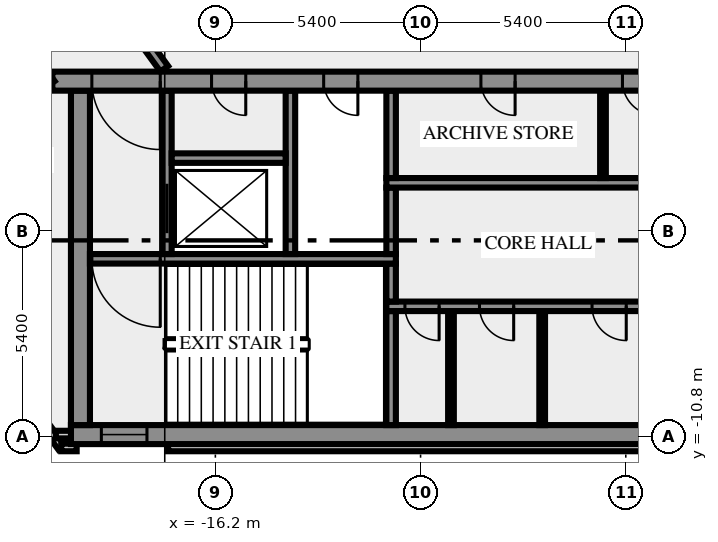
"""IFC4 building model, lengths in metres.
Left out: names, types, materials, properties, quantities, classifications, styles, units other than length and angle.
Written with IfcOpenShell. Run it as: python <this file> out.ifc"""

import sys

from ifc_helpers import new_model, si_unit, direction, frame, frame_2d, origin, place, context, subcontext, project, spatial, rectangle, extrude, element, fill, save


model = new_model("IFC4")
c1 = context("Model", 3, precision=1e-05, world=origin(), true_north=direction((0.0, 1.0)))
c2 = subcontext(c1, "Body", "Model", "MODEL_VIEW")
j1 = project(units=[si_unit("LENGTHUNIT", "METRE"), si_unit("PLANEANGLEUNIT", "RADIAN")], contexts=[c1])
p1 = place(None, origin())
s1 = spatial("IfcSite", under=j1, at=p1, CompositionType="ELEMENT")
p2 = place(p1, origin())
s2 = spatial("IfcBuilding", under=s1, at=p2, CompositionType="ELEMENT")
p3 = place(p2, frame((0.0, 0.0, 164.0)))
s3 = spatial("IfcBuildingStorey", under=s2, at=p3, CompositionType="ELEMENT", Elevation=164.0)
p4 = place(p3, frame((-21.833, -8.909, 0.0), z_axis=(0.0, 0.0, 1.0), x_axis=(0.587766567315, -0.809030569476, 0.0)))
e1 = element("IfcWall", 1, at=p4, inside=s3, PredefinedType="SOLIDWALL", context=c2, shape_type="SweptSolid", body=[
    extrude(rectangle(XDim=2.688, YDim=0.2, at=frame_2d((1.344, 0.0))), origin(), (0.0, 0.0, 1.0), 3.65),
])
p5 = place(p3, frame((-20.256, -11.088, 0.0), z_axis=(0.0, 0.0, 1.0), x_axis=(1.0, 0.0, 0.0)))
e2 = element("IfcWall", 2, at=p5, inside=s3, PredefinedType="SOLIDWALL", context=c2, shape_type="SweptSolid", body=[
    extrude(rectangle(XDim=0.406, YDim=0.2, at=frame_2d((0.203, 0.0))), origin(), (0.0, 0.0, 1.0), 3.65),
])
p6 = place(p3, frame((-17.444, -11.088, 0.0), z_axis=(0.0, 0.0, 1.0), x_axis=(1.0, 0.0, 0.0)))
e3 = element("IfcWall", 3, at=p6, inside=s3, PredefinedType="SOLIDWALL", context=c2, shape_type="SweptSolid", body=[
    extrude(rectangle(XDim=34.888, YDim=0.2, at=frame_2d((17.444, 0.0))), origin(), (0.0, 0.0, 1.0), 3.65),
])
p7 = place(p3, frame((-19.98, -10.75, 0.0), z_axis=(0.0, 0.0, 1.0), x_axis=(-1.0, 0.0, 0.0)))
e4 = element("IfcWall", 4, at=p7, inside=s3, PredefinedType="SOLIDWALL", context=c2, shape_type="SweptSolid", body=[
    extrude(rectangle(XDim=0.417, YDim=0.2, at=frame_2d((0.208, 0.0))), origin(), (0.0, 0.0, 1.0), 3.65),
])
p8 = place(p3, frame((-20.0, -10.75, 0.0), z_axis=(0.0, 0.0, 1.0), x_axis=(1.0, 0.0, 0.0)))
e5 = element("IfcWall", 5, at=p8, inside=s3, PredefinedType="SHEAR", context=c2, shape_type="SweptSolid", body=[
    extrude(rectangle(XDim=40.0, YDim=0.5, at=frame_2d((20.0, 0.0))), origin(), (0.0, 0.0, 1.0), 3.65),
])
p9 = place(p8, frame((0.8, 0.0, 1.0)))
e6 = element("IfcOpeningElement", 6, at=p9, cuts=e5, PredefinedType="OPENING", context=c2, shape_type="SweptSolid", body=[
    extrude(rectangle(XDim=1.2, YDim=1.2, at=frame_2d((0.6, 0.6))), frame((0.0, 0.26, 0.0), z_axis=(0.0, -1.0, 0.0), x_axis=(1.0, 0.0, 0.0)), (0.0, 0.0, 1.0), 0.52),
])
p10 = place(p8, frame((38.0, 0.0, 1.0)))
e7 = element("IfcOpeningElement", 7, at=p10, cuts=e5, PredefinedType="OPENING", context=c2, shape_type="SweptSolid", body=[
    extrude(rectangle(XDim=1.2, YDim=1.2, at=frame_2d((0.6, 0.6))), frame((0.0, 0.26, 0.0), z_axis=(0.0, -1.0, 0.0), x_axis=(1.0, 0.0, 0.0)), (0.0, 0.0, 1.0), 0.52),
])
p11 = place(p3, frame((-19.75, -10.5, 0.0), z_axis=(0.0, 0.0, 1.0), x_axis=(0.0, 1.0, 0.0)))
e8 = element("IfcWall", 8, at=p11, inside=s3, PredefinedType="SHEAR", context=c2, shape_type="SweptSolid", body=[
    extrude(rectangle(XDim=8.8, YDim=0.5, at=frame_2d((4.4, 0.0))), origin(), (0.0, 0.0, 1.0), 3.65),
])
p12 = place(p3, frame((-11.575, -10.5, 0.0), z_axis=(0.0, 0.0, 1.0), x_axis=(0.0, 1.0, 0.0)))
e9 = element("IfcWall", 9, at=p12, inside=s3, PredefinedType="SHEAR", context=c2, shape_type="SweptSolid", body=[
    extrude(rectangle(XDim=3.0, YDim=0.25, at=frame_2d((1.5, 0.0))), origin(), (0.0, 0.0, 1.0), 3.65),
])
for number, where, z_axis, x_axis in (
    (10, (-10.0, -10.5, 0.0), (0.0, 0.0, 1.0), (0.0, 1.0, 0.0)),
    (11, (-7.6, -10.5, 0.0), (0.0, 0.0, 1.0), (0.0, 1.0, 0.0)),
):
    element("IfcWall", number, at=place(p3, frame(where, z_axis=z_axis, x_axis=x_axis)), inside=s3, PredefinedType="PARTITIONING", context=c2, shape_type="SweptSolid", body=[
        extrude(rectangle(XDim=3.0, YDim=0.15, at=frame_2d((1.5, 0.0))), origin(), (0.0, 0.0, 1.0), 3.65),
    ])
p13 = place(p3, frame((11.7, -7.375, 0.0), z_axis=(0.0, 0.0, 1.0), x_axis=(-1.0, 0.0, 0.0)))
e12 = element("IfcWall", 12, at=p13, inside=s3, PredefinedType="SHEAR", context=c2, shape_type="SweptSolid", body=[
    extrude(rectangle(XDim=23.4, YDim=0.25, at=frame_2d((11.7, 0.0))), origin(), (0.0, 0.0, 1.0), 3.65),
])
p14 = place(p13, frame((22.012, 0.0, 0.0)))
e13 = element("IfcOpeningElement", 13, at=p14, cuts=e12, PredefinedType="OPENING", context=c2, shape_type="SweptSolid", body=[
    extrude(rectangle(XDim=0.9, YDim=2.1, at=frame_2d((0.45, 1.05))), frame((0.0, 0.135, 0.0), z_axis=(0.0, -1.0, 0.0), x_axis=(1.0, 0.0, 0.0)), (0.0, 0.0, 1.0), 0.27),
])
p15 = place(p13, frame((20.05, 0.0, 0.0)))
e14 = element("IfcOpeningElement", 14, at=p15, cuts=e12, PredefinedType="OPENING", context=c2, shape_type="SweptSolid", body=[
    extrude(rectangle(XDim=0.9, YDim=2.1, at=frame_2d((0.45, 1.05))), frame((0.0, 0.135, 0.0), z_axis=(0.0, -1.0, 0.0), x_axis=(1.0, 0.0, 0.0)), (0.0, 0.0, 1.0), 0.27),
])
p16 = place(p13, frame((17.088, 0.0, 0.0)))
e15 = element("IfcOpeningElement", 15, at=p16, cuts=e12, PredefinedType="OPENING", context=c2, shape_type="SweptSolid", body=[
    extrude(rectangle(XDim=0.9, YDim=2.1, at=frame_2d((0.45, 1.05))), frame((0.0, 0.135, 0.0), z_axis=(0.0, -1.0, 0.0), x_axis=(1.0, 0.0, 0.0)), (0.0, 0.0, 1.0), 0.27),
])
p17 = place(p13, frame((14.45, 0.0, 0.0)))
e16 = element("IfcOpeningElement", 16, at=p17, cuts=e12, PredefinedType="OPENING", context=c2, shape_type="SweptSolid", body=[
    extrude(rectangle(XDim=0.9, YDim=2.1, at=frame_2d((0.45, 1.05))), frame((0.0, 0.135, 0.0), z_axis=(0.0, -1.0, 0.0), x_axis=(1.0, 0.0, 0.0)), (0.0, 0.0, 1.0), 0.27),
])
p18 = place(p13, frame((12.95, 0.0, 0.0)))
e17 = element("IfcOpeningElement", 17, at=p18, cuts=e12, PredefinedType="OPENING", context=c2, shape_type="SweptSolid", body=[
    extrude(rectangle(XDim=0.9, YDim=2.1, at=frame_2d((0.45, 1.05))), frame((0.0, 0.135, 0.0), z_axis=(0.0, -1.0, 0.0), x_axis=(1.0, 0.0, 0.0)), (0.0, 0.0, 1.0), 0.27),
])
p19 = place(p13, frame((11.475, 0.0, 0.0)))
e18 = element("IfcOpeningElement", 18, at=p19, cuts=e12, PredefinedType="OPENING", context=c2, shape_type="SweptSolid", body=[
    extrude(rectangle(XDim=0.9, YDim=2.1, at=frame_2d((0.45, 1.05))), frame((0.0, 0.135, 0.0), z_axis=(0.0, -1.0, 0.0), x_axis=(1.0, 0.0, 0.0)), (0.0, 0.0, 1.0), 0.27),
])
p20 = place(p13, frame((10.45, 0.0, 0.0)))
e19 = element("IfcOpeningElement", 19, at=p20, cuts=e12, PredefinedType="OPENING", context=c2, shape_type="SweptSolid", body=[
    extrude(rectangle(XDim=0.5, YDim=2.1, at=frame_2d((0.25, 1.05))), frame((0.0, 0.135, 0.0), z_axis=(0.0, -1.0, 0.0), x_axis=(1.0, 0.0, 0.0)), (0.0, 0.0, 1.0), 0.27),
])
p21 = place(p13, frame((8.35, 0.0, 0.0)))
e20 = element("IfcOpeningElement", 20, at=p21, cuts=e12, PredefinedType="OPENING", context=c2, shape_type="SweptSolid", body=[
    extrude(rectangle(XDim=1.1, YDim=2.1, at=frame_2d((0.55, 1.05))), frame((0.0, 0.135, 0.0), z_axis=(0.0, -1.0, 0.0), x_axis=(1.0, 0.0, 0.0)), (0.0, 0.0, 1.0), 0.27),
])
p22 = place(p13, frame((5.85, 0.0, 0.0)))
e21 = element("IfcOpeningElement", 21, at=p22, cuts=e12, PredefinedType="OPENING", context=c2, shape_type="SweptSolid", body=[
    extrude(rectangle(XDim=1.1, YDim=2.1, at=frame_2d((0.55, 1.05))), frame((0.0, 0.135, 0.0), z_axis=(0.0, -1.0, 0.0), x_axis=(1.0, 0.0, 0.0)), (0.0, 0.0, 1.0), 0.27),
])
p23 = place(p13, frame((3.35, 0.0, 0.0)))
e22 = element("IfcOpeningElement", 22, at=p23, cuts=e12, PredefinedType="OPENING", context=c2, shape_type="SweptSolid", body=[
    extrude(rectangle(XDim=1.1, YDim=2.1, at=frame_2d((0.55, 1.05))), frame((0.0, 0.135, 0.0), z_axis=(0.0, -1.0, 0.0), x_axis=(1.0, 0.0, 0.0)), (0.0, 0.0, 1.0), 0.27),
])
p24 = place(p13, frame((0.85, 0.0, 0.0)))
e23 = element("IfcOpeningElement", 23, at=p24, cuts=e12, PredefinedType="OPENING", context=c2, shape_type="SweptSolid", body=[
    extrude(rectangle(XDim=1.1, YDim=2.1, at=frame_2d((0.55, 1.05))), frame((0.0, 0.135, 0.0), z_axis=(0.0, -1.0, 0.0), x_axis=(1.0, 0.0, 0.0)), (0.0, 0.0, 1.0), 0.27),
])
p25 = place(p3, frame((-11.575, -7.25, 0.0), z_axis=(0.0, 0.0, 1.0), x_axis=(0.0, 1.0, 0.0)))
e24 = element("IfcWall", 24, at=p25, inside=s3, PredefinedType="SHEAR", context=c2, shape_type="SweptSolid", body=[
    extrude(rectangle(XDim=1.0, YDim=0.25, at=frame_2d((0.5, 0.0))), origin(), (0.0, 0.0, 1.0), 3.65),
])
p26 = place(p3, frame((-11.45, -6.125, 0.0), z_axis=(0.0, 0.0, 1.0), x_axis=(-1.0, 0.0, 0.0)))
e25 = element("IfcWall", 25, at=p26, inside=s3, PredefinedType="SHEAR", context=c2, shape_type="SweptSolid", body=[
    extrude(rectangle(XDim=8.05, YDim=0.25, at=frame_2d((4.025, 0.0))), origin(), (0.0, 0.0, 1.0), 3.65),
])
p27 = place(p26, frame((6.2, 0.0, 0.0)))
e26 = element("IfcOpeningElement", 26, at=p27, cuts=e25, PredefinedType="OPENING", context=c2, shape_type="SweptSolid", body=[
    extrude(rectangle(XDim=1.8, YDim=2.1, at=frame_2d((0.9, 1.05))), frame((0.0, 0.135, 0.0), z_axis=(0.0, -1.0, 0.0), x_axis=(1.0, 0.0, 0.0)), (0.0, 0.0, 1.0), 0.27),
])
p28 = place(p3, frame((-17.475, -6.0, 0.0), z_axis=(0.0, 0.0, 1.0), x_axis=(0.0, 1.0, 0.0)))
e27 = element("IfcWall", 27, at=p28, inside=s3, PredefinedType="SHEAR", context=c2, shape_type="SweptSolid", body=[
    extrude(rectangle(XDim=4.3, YDim=0.25, at=frame_2d((2.15, 0.0))), origin(), (0.0, 0.0, 1.0), 3.65),
])
p29 = place(p28, frame((0.55, 0.0, 0.0)))
e28 = element("IfcOpeningElement", 28, at=p29, cuts=e27, PredefinedType="OPENING", context=c2, shape_type="SweptSolid", body=[
    extrude(rectangle(XDim=1.3, YDim=2.1, at=frame_2d((0.65, 1.05))), frame((0.0, 0.135, 0.0), z_axis=(0.0, -1.0, 0.0), x_axis=(1.0, 0.0, 0.0)), (0.0, 0.0, 1.0), 0.27),
])
p30 = place(p3, frame((-14.225, -6.0, 0.0), z_axis=(0.0, 0.0, 1.0), x_axis=(0.0, 1.0, 0.0)))
e29 = element("IfcWall", 29, at=p30, inside=s3, PredefinedType="SHEAR", context=c2, shape_type="SweptSolid", body=[
    extrude(rectangle(XDim=4.3, YDim=0.25, at=frame_2d((2.15, 0.0))), origin(), (0.0, 0.0, 1.0), 3.65),
])
p31 = place(p3, frame((-11.575, -6.0, 0.0), z_axis=(0.0, 0.0, 1.0), x_axis=(0.0, 1.0, 0.0)))
e30 = element("IfcWall", 30, at=p31, inside=s3, PredefinedType="SHEAR", context=c2, shape_type="SweptSolid", body=[
    extrude(rectangle(XDim=1.75, YDim=0.25, at=frame_2d((0.875, 0.0))), origin(), (0.0, 0.0, 1.0), 3.65),
])
p32 = place(p3, frame((-11.7, -4.125, 0.0), z_axis=(0.0, 0.0, 1.0), x_axis=(1.0, 0.0, 0.0)))
e31 = element("IfcWall", 31, at=p32, inside=s3, PredefinedType="SHEAR", context=c2, shape_type="SweptSolid", body=[
    extrude(rectangle(XDim=7.75, YDim=0.25, at=frame_2d((3.875, 0.0))), origin(), (0.0, 0.0, 1.0), 3.65),
])
p33 = place(p3, frame((-11.575, -4.0, 0.0), z_axis=(0.0, 0.0, 1.0), x_axis=(0.0, 1.0, 0.0)))
e32 = element("IfcWall", 32, at=p33, inside=s3, PredefinedType="SHEAR", context=c2, shape_type="SweptSolid", body=[
    extrude(rectangle(XDim=2.3, YDim=0.25, at=frame_2d((1.15, 0.0))), origin(), (0.0, 0.0, 1.0), 3.65),
])
p34 = place(p3, frame((-6.0, -4.0, 0.0), z_axis=(0.0, 0.0, 1.0), x_axis=(0.0, 1.0, 0.0)))
e33 = element("IfcWall", 33, at=p34, inside=s3, PredefinedType="PARTITIONING", context=c2, shape_type="SweptSolid", body=[
    extrude(rectangle(XDim=2.3, YDim=0.15, at=frame_2d((1.15, 0.0))), origin(), (0.0, 0.0, 1.0), 3.65),
])
p35 = place(p3, frame((-17.35, -3.475, 0.0), z_axis=(0.0, 0.0, 1.0), x_axis=(1.0, 0.0, 0.0)))
e34 = element("IfcWall", 34, at=p35, inside=s3, PredefinedType="SHEAR", context=c2, shape_type="SweptSolid", body=[
    extrude(rectangle(XDim=3.0, YDim=0.25, at=frame_2d((1.5, 0.0))), origin(), (0.0, 0.0, 1.0), 3.65),
])
p36 = place(p3, frame((20.49, -1.45, 0.0), z_axis=(0.0, 0.0, 1.0), x_axis=(-1.0, 0.0, 0.0)))
e35 = element("IfcWall", 35, at=p36, inside=s3, PredefinedType="SHEAR", context=c2, shape_type="SweptSolid", body=[
    extrude(rectangle(XDim=40.98, YDim=0.5, at=frame_2d((20.49, 0.0))), origin(), (0.0, 0.0, 1.0), 3.65),
])
p37 = place(p36, frame((38.14, 0.0, 0.0)))
e36 = element("IfcOpeningElement", 36, at=p37, cuts=e35, PredefinedType="OPENING", context=c2, shape_type="SweptSolid", body=[
    extrude(rectangle(XDim=1.8, YDim=2.1, at=frame_2d((0.9, 1.05))), frame((0.0, 0.26, 0.0), z_axis=(0.0, -1.0, 0.0), x_axis=(1.0, 0.0, 0.0)), (0.0, 0.0, 1.0), 0.52),
])
p38 = place(p36, frame((35.89, 0.0, 0.0)))
e37 = element("IfcOpeningElement", 37, at=p38, cuts=e35, PredefinedType="OPENING", context=c2, shape_type="SweptSolid", body=[
    extrude(rectangle(XDim=0.9, YDim=2.1, at=frame_2d((0.45, 1.05))), frame((0.0, 0.26, 0.0), z_axis=(0.0, -1.0, 0.0), x_axis=(1.0, 0.0, 0.0)), (0.0, 0.0, 1.0), 0.52),
])
p39 = place(p36, frame((32.94, 0.0, 0.0)))
e38 = element("IfcOpeningElement", 38, at=p39, cuts=e35, PredefinedType="OPENING", context=c2, shape_type="SweptSolid", body=[
    extrude(rectangle(XDim=0.9, YDim=2.1, at=frame_2d((0.45, 1.05))), frame((0.0, 0.26, 0.0), z_axis=(0.0, -1.0, 0.0), x_axis=(1.0, 0.0, 0.0)), (0.0, 0.0, 1.0), 0.52),
])
p40 = place(p36, frame((28.802, 0.0, 0.0)))
e39 = element("IfcOpeningElement", 39, at=p40, cuts=e35, PredefinedType="OPENING", context=c2, shape_type="SweptSolid", body=[
    extrude(rectangle(XDim=0.9, YDim=2.1, at=frame_2d((0.45, 1.05))), frame((0.0, 0.26, 0.0), z_axis=(0.0, -1.0, 0.0), x_axis=(1.0, 0.0, 0.0)), (0.0, 0.0, 1.0), 0.52),
])
p41 = place(p36, frame((25.077, 0.0, 0.0)))
e40 = element("IfcOpeningElement", 40, at=p41, cuts=e35, PredefinedType="OPENING", context=c2, shape_type="SweptSolid", body=[
    extrude(rectangle(XDim=0.9, YDim=2.1, at=frame_2d((0.45, 1.05))), frame((0.0, 0.26, 0.0), z_axis=(0.0, -1.0, 0.0), x_axis=(1.0, 0.0, 0.0)), (0.0, 0.0, 1.0), 0.52),
])
p42 = place(p36, frame((21.765, 0.0, 0.0)))
e41 = element("IfcOpeningElement", 41, at=p42, cuts=e35, PredefinedType="OPENING", context=c2, shape_type="SweptSolid", body=[
    extrude(rectangle(XDim=2.0, YDim=2.1, at=frame_2d((1.0, 1.05))), frame((0.0, 0.26, 0.0), z_axis=(0.0, -1.0, 0.0), x_axis=(1.0, 0.0, 0.0)), (0.0, 0.0, 1.0), 0.52),
])
p43 = place(p36, frame((7.14, 0.0, 0.0)))
e42 = element("IfcOpeningElement", 42, at=p43, cuts=e35, PredefinedType="OPENING", context=c2, shape_type="SweptSolid", body=[
    extrude(rectangle(XDim=0.9, YDim=2.1, at=frame_2d((0.45, 1.05))), frame((0.0, 0.26, 0.0), z_axis=(0.0, -1.0, 0.0), x_axis=(1.0, 0.0, 0.0)), (0.0, 0.0, 1.0), 0.52),
])
p44 = place(p36, frame((5.028, 0.0, 0.0)))
e43 = element("IfcOpeningElement", 43, at=p44, cuts=e35, PredefinedType="OPENING", context=c2, shape_type="SweptSolid", body=[
    extrude(rectangle(XDim=0.8, YDim=2.1, at=frame_2d((0.4, 1.05))), frame((0.0, 0.26, 0.0), z_axis=(0.0, -1.0, 0.0), x_axis=(1.0, 0.0, 0.0)), (0.0, 0.0, 1.0), 0.52),
])
p45 = place(p36, frame((3.452, 0.0, 0.0)))
e44 = element("IfcOpeningElement", 44, at=p45, cuts=e35, PredefinedType="OPENING", context=c2, shape_type="SweptSolid", body=[
    extrude(rectangle(XDim=0.8, YDim=2.1, at=frame_2d((0.4, 1.05))), frame((0.0, 0.26, 0.0), z_axis=(0.0, -1.0, 0.0), x_axis=(1.0, 0.0, 0.0)), (0.0, 0.0, 1.0), 0.52),
])
p46 = place(p36, frame((1.04, 0.0, 0.0)))
e45 = element("IfcOpeningElement", 45, at=p46, cuts=e35, PredefinedType="OPENING", context=c2, shape_type="SweptSolid", body=[
    extrude(rectangle(XDim=1.8, YDim=2.1, at=frame_2d((0.9, 1.05))), frame((0.0, 0.26, 0.0), z_axis=(0.0, -1.0, 0.0), x_axis=(1.0, 0.0, 0.0)), (0.0, 0.0, 1.0), 0.52),
])
p47 = place(p3, frame((-20.531, -1.523, 0.0), z_axis=(0.0, 0.0, 1.0), x_axis=(-0.587781654618, 0.809019608226, 0.0)))
e46 = element("IfcWall", 46, at=p47, inside=s3, PredefinedType="SOLIDWALL", context=c2, shape_type="SweptSolid", body=[
    extrude(rectangle(XDim=33.911, YDim=0.25, at=frame_2d((16.956, 0.0))), origin(), (0.0, 0.0, 1.0), 3.65),
])
p48 = place(p47, frame((19.743, 0.0, 0.0)))
e47 = element("IfcOpeningElement", 47, at=p48, cuts=e46, PredefinedType="OPENING", context=c2, shape_type="SweptSolid", body=[
    extrude(rectangle(XDim=1.8, YDim=2.1, at=frame_2d((0.9, 1.05))), frame((0.0, 0.135, 0.0), z_axis=(0.0, -1.0, 0.0), x_axis=(1.0, 0.0, 0.0)), (0.0, 0.0, 1.0), 0.27),
])
p49 = place(p47, frame((2.924, 0.0, 0.0)))
e48 = element("IfcOpeningElement", 48, at=p49, cuts=e46, PredefinedType="OPENING", context=c2, shape_type="SweptSolid", body=[
    extrude(rectangle(XDim=1.8, YDim=2.1, at=frame_2d((0.9, 1.05))), frame((0.0, 0.135, 0.0), z_axis=(0.0, -1.0, 0.0), x_axis=(1.0, 0.0, 0.0)), (0.0, 0.0, 1.0), 0.27),
])
p50 = place(p3, frame((-38.32, 27.469, 0.0), z_axis=(0.0, 0.0, 1.0), x_axis=(0.587788021768, -0.809014982226, 0.0)))
e49 = element("IfcWall", 49, at=p50, inside=s3, PredefinedType="SOLIDWALL", context=c2, shape_type="SweptSolid", body=[
    extrude(rectangle(XDim=35.344, YDim=0.25, at=frame_2d((17.672, 0.0))), origin(), (0.0, 0.0, 1.0), 3.65),
])
p51 = place(p50, frame((31.003, 0.0, 0.0)))
e50 = element("IfcOpeningElement", 50, at=p51, cuts=e49, PredefinedType="OPENING", context=c2, shape_type="SweptSolid", body=[
    extrude(rectangle(XDim=0.9, YDim=2.1, at=frame_2d((0.45, 1.05))), frame((0.0, 0.135, 0.0), z_axis=(0.0, -1.0, 0.0), x_axis=(1.0, 0.0, 0.0)), (0.0, 0.0, 1.0), 0.27),
])
p52 = place(p50, frame((16.687, 0.0, 0.0)))
e51 = element("IfcOpeningElement", 51, at=p52, cuts=e49, PredefinedType="OPENING", context=c2, shape_type="SweptSolid", body=[
    extrude(rectangle(XDim=0.9, YDim=2.1, at=frame_2d((0.45, 1.05))), frame((0.0, 0.135, 0.0), z_axis=(0.0, -1.0, 0.0), x_axis=(1.0, 0.0, 0.0)), (0.0, 0.0, 1.0), 0.27),
])
p53 = place(p9, origin())
e52 = element("IfcWindow", 52, at=p53, inside=s3, PartitioningType="SINGLE_PANEL", PredefinedType="WINDOW", context=c2, shape_type="SweptSolid", body=[
    extrude(rectangle(XDim=1.2, YDim=1.2, at=frame_2d((0.6, 0.6))), frame((0.0, 0.03, 0.0), z_axis=(0.0, -1.0, 0.0), x_axis=(1.0, 0.0, 0.0)), (0.0, 0.0, 1.0), 0.06),
])
fill(e6, e52)
p54 = place(p14, origin())
e53 = element("IfcDoor", 53, at=p54, inside=s3, OperationType="SINGLE_SWING_RIGHT", PredefinedType="DOOR", context=c2, shape_type="SweptSolid", body=[
    extrude(rectangle(XDim=0.9, YDim=2.1, at=frame_2d((0.45, 1.05))), frame((0.0, 0.025, 0.0), z_axis=(0.0, -1.0, 0.0), x_axis=(1.0, 0.0, 0.0)), (0.0, 0.0, 1.0), 0.05),
])
fill(e13, e53)
p55 = place(p15, origin())
e54 = element("IfcDoor", 54, at=p55, inside=s3, OperationType="SINGLE_SWING_RIGHT", PredefinedType="DOOR", context=c2, shape_type="SweptSolid", body=[
    extrude(rectangle(XDim=0.9, YDim=2.1, at=frame_2d((0.45, 1.05))), frame((0.0, 0.025, 0.0), z_axis=(0.0, -1.0, 0.0), x_axis=(1.0, 0.0, 0.0)), (0.0, 0.0, 1.0), 0.05),
])
fill(e14, e54)
p56 = place(p16, origin())
e55 = element("IfcDoor", 55, at=p56, inside=s3, OperationType="SINGLE_SWING_RIGHT", PredefinedType="DOOR", context=c2, shape_type="SweptSolid", body=[
    extrude(rectangle(XDim=0.9, YDim=2.1, at=frame_2d((0.45, 1.05))), frame((0.0, 0.025, 0.0), z_axis=(0.0, -1.0, 0.0), x_axis=(1.0, 0.0, 0.0)), (0.0, 0.0, 1.0), 0.05),
])
fill(e15, e55)
p57 = place(p27, origin())
e56 = element("IfcDoor", 56, at=p57, inside=s3, OperationType="DOUBLE_DOOR_SINGLE_SWING", PredefinedType="DOOR", context=c2, shape_type="SweptSolid", body=[
    extrude(rectangle(XDim=1.8, YDim=2.1, at=frame_2d((0.9, 1.05))), frame((0.0, 0.025, 0.0), z_axis=(0.0, -1.0, 0.0), x_axis=(1.0, 0.0, 0.0)), (0.0, 0.0, 1.0), 0.05),
])
fill(e26, e56)
p58 = place(p29, origin())
e57 = element("IfcDoor", 57, at=p58, inside=s3, OperationType="DOUBLE_DOOR_SLIDING", PredefinedType="DOOR", context=c2, shape_type="SweptSolid", body=[
    extrude(rectangle(XDim=1.3, YDim=2.1, at=frame_2d((0.65, 1.05))), frame((0.0, 0.025, 0.0), z_axis=(0.0, -1.0, 0.0), x_axis=(1.0, 0.0, 0.0)), (0.0, 0.0, 1.0), 0.05),
])
fill(e28, e57)
p59 = place(p37, origin())
e58 = element("IfcDoor", 58, at=p59, inside=s3, OperationType="DOUBLE_DOOR_SINGLE_SWING", PredefinedType="DOOR", context=c2, shape_type="SweptSolid", body=[
    extrude(rectangle(XDim=1.8, YDim=2.1, at=frame_2d((0.9, 1.05))), frame((0.0, 0.025, 0.0), z_axis=(0.0, -1.0, 0.0), x_axis=(1.0, 0.0, 0.0)), (0.0, 0.0, 1.0), 0.05),
])
fill(e36, e58)
p60 = place(p38, origin())
e59 = element("IfcDoor", 59, at=p60, inside=s3, OperationType="SINGLE_SWING_RIGHT", PredefinedType="DOOR", context=c2, shape_type="SweptSolid", body=[
    extrude(rectangle(XDim=0.9, YDim=2.1, at=frame_2d((0.45, 1.05))), frame((0.0, 0.025, 0.0), z_axis=(0.0, -1.0, 0.0), x_axis=(1.0, 0.0, 0.0)), (0.0, 0.0, 1.0), 0.05),
])
fill(e37, e59)
p61 = place(p39, origin())
e60 = element("IfcDoor", 60, at=p61, inside=s3, OperationType="SINGLE_SWING_RIGHT", PredefinedType="DOOR", context=c2, shape_type="SweptSolid", body=[
    extrude(rectangle(XDim=0.9, YDim=2.1, at=frame_2d((0.45, 1.05))), frame((0.0, 0.025, 0.0), z_axis=(0.0, -1.0, 0.0), x_axis=(1.0, 0.0, 0.0)), (0.0, 0.0, 1.0), 0.05),
])
fill(e38, e60)
p62 = place(p40, origin())
e61 = element("IfcDoor", 61, at=p62, inside=s3, OperationType="SINGLE_SWING_RIGHT", PredefinedType="DOOR", context=c2, shape_type="SweptSolid", body=[
    extrude(rectangle(XDim=0.9, YDim=2.1, at=frame_2d((0.45, 1.05))), frame((0.0, 0.025, 0.0), z_axis=(0.0, -1.0, 0.0), x_axis=(1.0, 0.0, 0.0)), (0.0, 0.0, 1.0), 0.05),
])
fill(e39, e61)
p63 = place(p41, origin())
e62 = element("IfcDoor", 62, at=p63, inside=s3, OperationType="SINGLE_SWING_RIGHT", PredefinedType="DOOR", context=c2, shape_type="SweptSolid", body=[
    extrude(rectangle(XDim=0.9, YDim=2.1, at=frame_2d((0.45, 1.05))), frame((0.0, 0.025, 0.0), z_axis=(0.0, -1.0, 0.0), x_axis=(1.0, 0.0, 0.0)), (0.0, 0.0, 1.0), 0.05),
])
fill(e40, e62)
save(model, sys.argv[1])
